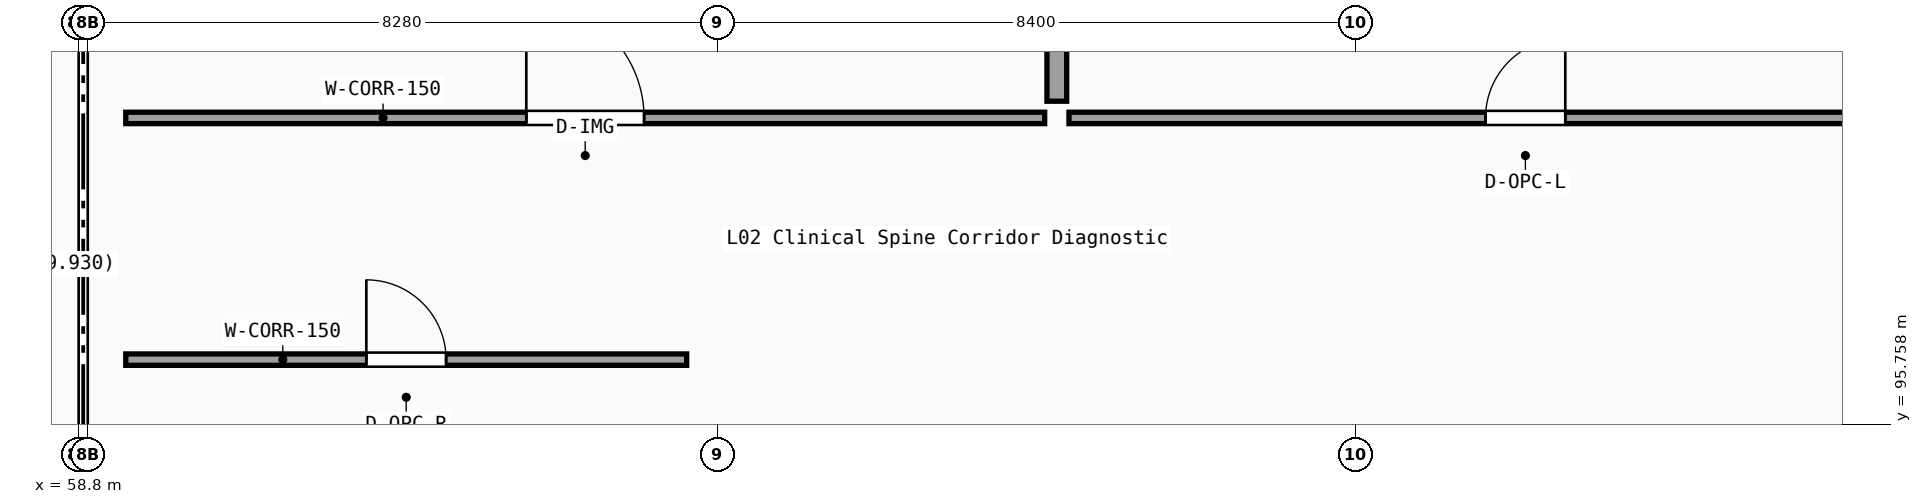
"""IFC4 building model, lengths in metres.
Left out: names, types, materials, properties, quantities, classifications, styles, units other than length and angle.
Written with IfcOpenShell. Run it as: python <this file> out.ifc"""

import sys

from ifc_helpers import new_model, si_unit, direction, frame, frame_2d, origin, place, context, subcontext, project, spatial, rectangle, extrude, element, fill, save


model = new_model("IFC4")
c1 = context("Model", 3, precision=1e-05, world=origin(), true_north=direction((0.0, 1.0)))
c2 = subcontext(c1, "Body", "Model", "MODEL_VIEW")
j1 = project(units=[si_unit("LENGTHUNIT", "METRE"), si_unit("PLANEANGLEUNIT", "RADIAN")], contexts=[c1])
p1 = place(None, origin())
s1 = spatial("IfcSite", under=j1, at=p1, CompositionType="ELEMENT")
p2 = place(p1, origin())
s2 = spatial("IfcBuilding", under=s1, at=p2, CompositionType="ELEMENT")
p3 = place(p2, frame((0.0, 0.0, 10.2)))
s3 = spatial("IfcBuildingStorey", under=s2, at=p3, CompositionType="ELEMENT", Elevation=10.2)
p4 = place(p3, frame((59.42, 96.61, 0.0), z_axis=(0.0, 0.0, 1.0), x_axis=(1.0, 0.0, 0.0)))
e1 = element("IfcWall", 1, at=p4, inside=s3, PredefinedType="PARTITIONING", context=c2, shape_type="SweptSolid", body=[
    extrude(rectangle(XDim=7.38, YDim=0.15, at=frame_2d((3.69, 0.0))), origin(), (0.0, 0.0, 1.0), 4.04),
])
p5 = place(p4, frame((3.165, 0.0, 0.0)))
e2 = element("IfcOpeningElement", 2, at=p5, cuts=e1, PredefinedType="OPENING", context=c2, shape_type="SweptSolid", body=[
    extrude(rectangle(XDim=1.05, YDim=2.15, at=frame_2d((0.525, 1.075))), frame((0.0, 0.085, 0.0), z_axis=(0.0, -1.0, 0.0), x_axis=(1.0, 0.0, 0.0)), (0.0, 0.0, 1.0), 0.17),
])
p6 = place(p3, frame((59.42, 99.79, 0.0), z_axis=(0.0, 0.0, 1.0), x_axis=(1.0, 0.0, 0.0)))
e3 = element("IfcWall", 3, at=p6, inside=s3, PredefinedType="PARTITIONING", context=c2, shape_type="SweptSolid", body=[
    extrude(rectangle(XDim=12.09, YDim=0.15, at=frame_2d((6.045, 0.0))), origin(), (0.0, 0.0, 1.0), 4.04),
])
p7 = place(p6, frame((5.27, 0.0, 0.0)))
e4 = element("IfcOpeningElement", 4, at=p7, cuts=e3, PredefinedType="OPENING", context=c2, shape_type="SweptSolid", body=[
    extrude(rectangle(XDim=1.55, YDim=2.25, at=frame_2d((0.775, 1.125))), frame((0.0, 0.085, 0.0), z_axis=(0.0, -1.0, 0.0), x_axis=(1.0, 0.0, 0.0)), (0.0, 0.0, 1.0), 0.17),
])
p8 = place(p3, frame((71.67, 100.01, 0.0), z_axis=(0.0, 0.0, 1.0), x_axis=(0.0, 1.0, 0.0)))
e5 = element("IfcWall", 5, at=p8, inside=s3, PredefinedType="PARTITIONING", context=c2, shape_type="SweptSolid", body=[
    extrude(rectangle(XDim=16.1, YDim=0.26, at=frame_2d((8.05, 0.0))), origin(), (0.0, 0.0, 1.0), 4.04),
])
p9 = place(p3, frame((71.83, 99.79, 0.0), z_axis=(0.0, 0.0, 1.0), x_axis=(1.0, 0.0, 0.0)))
e6 = element("IfcWall", 6, at=p9, inside=s3, PredefinedType="PARTITIONING", context=c2, shape_type="SweptSolid", body=[
    extrude(rectangle(XDim=12.01, YDim=0.15, at=frame_2d((6.005, 0.0))), origin(), (0.0, 0.0, 1.0), 4.04),
])
p10 = place(p9, frame((5.48, 0.0, 0.0)))
e7 = element("IfcOpeningElement", 7, at=p10, cuts=e6, PredefinedType="OPENING", context=c2, shape_type="SweptSolid", body=[
    extrude(rectangle(XDim=1.05, YDim=2.15, at=frame_2d((0.525, 1.075))), frame((0.0, 0.085, 0.0), z_axis=(0.0, -1.0, 0.0), x_axis=(1.0, 0.0, 0.0)), (0.0, 0.0, 1.0), 0.17),
])
p11 = place(p5, origin())
e8 = element("IfcDoor", 8, at=p11, inside=s3, OperationType="SINGLE_SWING_LEFT", PredefinedType="DOOR", context=c2, shape_type="SweptSolid", body=[
    extrude(rectangle(XDim=1.05, YDim=2.15, at=frame_2d((0.525, 1.075))), frame((0.0, 0.025, 0.0), z_axis=(0.0, -1.0, 0.0), x_axis=(1.0, 0.0, 0.0)), (0.0, 0.0, 1.0), 0.05),
])
fill(e2, e8)
p12 = place(p7, origin())
e9 = element("IfcDoor", 9, at=p12, inside=s3, OperationType="SINGLE_SWING_LEFT", PredefinedType="DOOR", context=c2, shape_type="SweptSolid", body=[
    extrude(rectangle(XDim=1.55, YDim=2.25, at=frame_2d((0.775, 1.125))), frame((0.0, 0.025, 0.0), z_axis=(0.0, -1.0, 0.0), x_axis=(1.0, 0.0, 0.0)), (0.0, 0.0, 1.0), 0.05),
])
fill(e4, e9)
p13 = place(p10, origin())
e10 = element("IfcDoor", 10, at=p13, inside=s3, OperationType="SINGLE_SWING_RIGHT", PredefinedType="DOOR", context=c2, shape_type="SweptSolid", body=[
    extrude(rectangle(XDim=1.05, YDim=2.15, at=frame_2d((0.525, 1.075))), frame((0.0, 0.025, 0.0), z_axis=(0.0, -1.0, 0.0), x_axis=(1.0, 0.0, 0.0)), (0.0, 0.0, 1.0), 0.05),
])
fill(e7, e10)
save(model, sys.argv[1])
